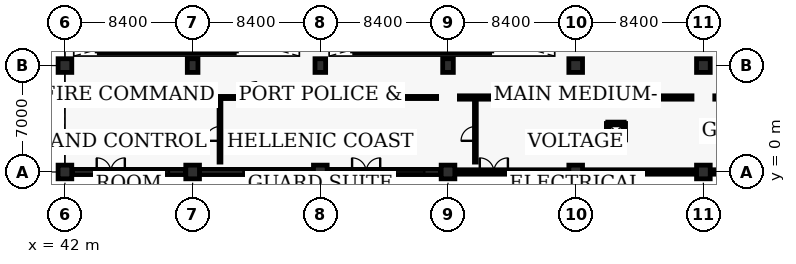
"""IFC4 building model, lengths in metres.
Left out: names, types, materials, properties, quantities, classifications, styles, units other than length and angle.
Written with IfcOpenShell. Run it as: python <this file> out.ifc"""

import sys

from ifc_helpers import new_model, si_unit, direction, frame, frame_2d, origin, origin_2d, place, context, subcontext, project, spatial, rectangle, extrude, element, fill, save


model = new_model("IFC4")
c1 = context("Model", 3, precision=1e-05, world=origin(), true_north=direction((0.0, 1.0)))
c2 = subcontext(c1, "Body", "Model", "MODEL_VIEW")
j1 = project(units=[si_unit("LENGTHUNIT", "METRE"), si_unit("PLANEANGLEUNIT", "RADIAN")], contexts=[c1])
p1 = place(None, origin())
s1 = spatial("IfcSite", under=j1, at=p1, CompositionType="ELEMENT")
p2 = place(p1, origin())
s2 = spatial("IfcBuilding", under=s1, at=p2, CompositionType="ELEMENT")
p3 = place(p2, origin())
s3 = spatial("IfcBuildingStorey", under=s2, at=p3, CompositionType="ELEMENT", Elevation=0.0)
for number, where, z_axis, x_axis in (
    (1, (42.0, 0.0, -0.46), (0.0, 0.0, 1.0), (1.0, 0.0, 0.0)),
    (2, (42.0, 7.0, -0.46), (0.0, 0.0, 1.0), (1.0, 0.0, 0.0)),
    (3, (50.4, 0.0, -0.46), (0.0, 0.0, 1.0), (1.0, 0.0, 0.0)),
):
    element("IfcColumn", number, at=place(p3, frame(where, z_axis=z_axis, x_axis=x_axis)), inside=s3, PredefinedType="COLUMN", context=c2, shape_type="SweptSolid", body=[
        extrude(rectangle(XDim=0.9, YDim=0.9, at=origin_2d()), origin(), (0.0, 0.0, 1.0), 5.9),
    ])
p4 = place(p3, frame((50.4, 7.0, -0.46), z_axis=(0.0, 0.0, 1.0), x_axis=(1.0, 0.0, 0.0)))
e4 = element("IfcColumn", 4, at=p4, inside=s3, PredefinedType="COLUMN", context=c2, shape_type="SweptSolid", body=[
    extrude(rectangle(XDim=0.7, YDim=0.9, at=origin_2d()), origin(), (0.0, 0.0, 1.0), 5.9),
])
p5 = place(p3, frame((58.8, 0.0, -0.46), z_axis=(0.0, 0.0, 1.0), x_axis=(1.0, 0.0, 0.0)))
e5 = element("IfcColumn", 5, at=p5, inside=s3, PredefinedType="COLUMN", context=c2, shape_type="SweptSolid", body=[
    extrude(rectangle(XDim=0.9, YDim=0.9, at=origin_2d()), origin(), (0.0, 0.0, 1.0), 5.9),
])
p6 = place(p3, frame((58.8, 7.0, -0.46), z_axis=(0.0, 0.0, 1.0), x_axis=(1.0, 0.0, 0.0)))
e6 = element("IfcColumn", 6, at=p6, inside=s3, PredefinedType="COLUMN", context=c2, shape_type="SweptSolid", body=[
    extrude(rectangle(XDim=0.7, YDim=0.9, at=origin_2d()), origin(), (0.0, 0.0, 1.0), 5.9),
])
p7 = place(p3, frame((67.2, 0.0, -0.46), z_axis=(0.0, 0.0, 1.0), x_axis=(1.0, 0.0, 0.0)))
e7 = element("IfcColumn", 7, at=p7, inside=s3, PredefinedType="COLUMN", context=c2, shape_type="SweptSolid", body=[
    extrude(rectangle(XDim=0.9, YDim=0.9, at=origin_2d()), origin(), (0.0, 0.0, 1.0), 5.9),
])
p8 = place(p3, frame((67.2, 7.0, -0.46), z_axis=(0.0, 0.0, 1.0), x_axis=(1.0, 0.0, 0.0)))
e8 = element("IfcColumn", 8, at=p8, inside=s3, PredefinedType="COLUMN", context=c2, shape_type="SweptSolid", body=[
    extrude(rectangle(XDim=0.7, YDim=0.9, at=origin_2d()), origin(), (0.0, 0.0, 1.0), 5.9),
])
for number, where, z_axis, x_axis in (
    (9, (75.6, 0.0, -0.46), (0.0, 0.0, 1.0), (1.0, 0.0, 0.0)),
    (10, (75.6, 7.0, -0.46), (0.0, 0.0, 1.0), (1.0, 0.0, 0.0)),
    (11, (84.0, 0.0, -0.46), (0.0, 0.0, 1.0), (1.0, 0.0, 0.0)),
    (12, (84.0, 7.0, -0.46), (0.0, 0.0, 1.0), (1.0, 0.0, 0.0)),
):
    element("IfcColumn", number, at=place(p3, frame(where, z_axis=z_axis, x_axis=x_axis)), inside=s3, PredefinedType="COLUMN", context=c2, shape_type="SweptSolid", body=[
        extrude(rectangle(XDim=0.9, YDim=0.9, at=origin_2d()), origin(), (0.0, 0.0, 1.0), 5.9),
    ])
p9 = place(p3, frame((42.45, 0.0, 0.0), z_axis=(0.0, 0.0, 1.0), x_axis=(1.0, 0.0, 0.0)))
e13 = element("IfcWall", 13, at=p9, inside=s3, PredefinedType="SOLIDWALL", context=c2, shape_type="SweptSolid", body=[
    extrude(rectangle(XDim=7.5, YDim=0.34, at=frame_2d((3.75, 0.0))), origin(), (0.0, 0.0, 1.0), 4.625),
])
p10 = place(p9, frame((1.64, 0.0, 0.0)))
e14 = element("IfcOpeningElement", 14, at=p10, cuts=e13, PredefinedType="OPENING", context=c2, shape_type="SweptSolid", body=[
    extrude(rectangle(XDim=1.85, YDim=2.2, at=frame_2d((0.925, 1.1))), frame((0.0, 0.18, 0.0), z_axis=(0.0, -1.0, 0.0), x_axis=(1.0, 0.0, 0.0)), (0.0, 0.0, 1.0), 0.36),
])
p11 = place(p9, frame((4.39, 0.0, 1.05)))
e15 = element("IfcOpeningElement", 15, at=p11, cuts=e13, PredefinedType="OPENING", context=c2, shape_type="SweptSolid", body=[
    extrude(rectangle(XDim=2.0, YDim=1.45, at=frame_2d((1.0, 0.725))), frame((0.0, 0.18, 0.0), z_axis=(0.0, -1.0, 0.0), x_axis=(1.0, 0.0, 0.0)), (0.0, 0.0, 1.0), 0.36),
])
p12 = place(p3, frame((50.85, 0.0, 0.0), z_axis=(0.0, 0.0, 1.0), x_axis=(1.0, 0.0, 0.0)))
e16 = element("IfcWall", 16, at=p12, inside=s3, PredefinedType="SOLIDWALL", context=c2, shape_type="SweptSolid", body=[
    extrude(rectangle(XDim=7.5, YDim=0.34, at=frame_2d((3.75, 0.0))), origin(), (0.0, 0.0, 1.0), 4.625),
])
p13 = place(p12, frame((2.89, 0.0, 1.05)))
e17 = element("IfcOpeningElement", 17, at=p13, cuts=e16, PredefinedType="OPENING", context=c2, shape_type="SweptSolid", body=[
    extrude(rectangle(XDim=1.8, YDim=1.5, at=frame_2d((0.9, 0.75))), frame((0.0, 0.18, 0.0), z_axis=(0.0, -1.0, 0.0), x_axis=(1.0, 0.0, 0.0)), (0.0, 0.0, 1.0), 0.36),
])
p14 = place(p3, frame((59.25, 0.0, 0.0), z_axis=(0.0, 0.0, 1.0), x_axis=(1.0, 0.0, 0.0)))
e18 = element("IfcWall", 18, at=p14, inside=s3, PredefinedType="SOLIDWALL", context=c2, shape_type="SweptSolid", body=[
    extrude(rectangle(XDim=7.5, YDim=0.34, at=frame_2d((3.75, 0.0))), origin(), (0.0, 0.0, 1.0), 4.625),
])
p15 = place(p14, frame((1.64, 0.0, 0.0)))
e19 = element("IfcOpeningElement", 19, at=p15, cuts=e18, PredefinedType="OPENING", context=c2, shape_type="SweptSolid", body=[
    extrude(rectangle(XDim=1.85, YDim=2.2, at=frame_2d((0.925, 1.1))), frame((0.0, 0.18, 0.0), z_axis=(0.0, -1.0, 0.0), x_axis=(1.0, 0.0, 0.0)), (0.0, 0.0, 1.0), 0.36),
])
p16 = place(p14, frame((4.39, 0.0, 1.05)))
e20 = element("IfcOpeningElement", 20, at=p16, cuts=e18, PredefinedType="OPENING", context=c2, shape_type="SweptSolid", body=[
    extrude(rectangle(XDim=2.0, YDim=1.45, at=frame_2d((1.0, 0.725))), frame((0.0, 0.18, 0.0), z_axis=(0.0, -1.0, 0.0), x_axis=(1.0, 0.0, 0.0)), (0.0, 0.0, 1.0), 0.36),
])
p17 = place(p3, frame((67.65, 0.0, 0.0), z_axis=(0.0, 0.0, 1.0), x_axis=(1.0, 0.0, 0.0)))
e21 = element("IfcWall", 21, at=p17, inside=s3, PredefinedType="SOLIDWALL", context=c2, shape_type="SweptSolid", body=[
    extrude(rectangle(XDim=7.5, YDim=0.29, at=frame_2d((3.75, 0.0))), origin(), (0.0, 0.0, 1.0), 4.625),
])
p18 = place(p17, frame((1.64, 0.0, 0.0)))
e22 = element("IfcOpeningElement", 22, at=p18, cuts=e21, PredefinedType="OPENING", context=c2, shape_type="SweptSolid", body=[
    extrude(rectangle(XDim=1.85, YDim=2.2, at=frame_2d((0.925, 1.1))), frame((0.0, 0.155, 0.0), z_axis=(0.0, -1.0, 0.0), x_axis=(1.0, 0.0, 0.0)), (0.0, 0.0, 1.0), 0.31),
])
p19 = place(p17, frame((4.39, 0.0, 1.05)))
e23 = element("IfcOpeningElement", 23, at=p19, cuts=e21, PredefinedType="OPENING", context=c2, shape_type="SweptSolid", body=[
    extrude(rectangle(XDim=1.8, YDim=1.5, at=frame_2d((0.9, 0.75))), frame((0.0, 0.155, 0.0), z_axis=(0.0, -1.0, 0.0), x_axis=(1.0, 0.0, 0.0)), (0.0, 0.0, 1.0), 0.31),
])
p20 = place(p3, frame((76.05, 0.0, 0.0), z_axis=(0.0, 0.0, 1.0), x_axis=(1.0, 0.0, 0.0)))
e24 = element("IfcWall", 24, at=p20, inside=s3, PredefinedType="SOLIDWALL", context=c2, shape_type="SweptSolid", body=[
    extrude(rectangle(XDim=7.5, YDim=0.29, at=frame_2d((3.75, 0.0))), origin(), (0.0, 0.0, 1.0), 4.625),
])
p21 = place(p20, frame((2.89, 0.0, 1.05)))
e25 = element("IfcOpeningElement", 25, at=p21, cuts=e24, PredefinedType="OPENING", context=c2, shape_type="SweptSolid", body=[
    extrude(rectangle(XDim=2.0, YDim=1.45, at=frame_2d((1.0, 0.725))), frame((0.0, 0.155, 0.0), z_axis=(0.0, -1.0, 0.0), x_axis=(1.0, 0.0, 0.0)), (0.0, 0.0, 1.0), 0.31),
])
p22 = place(p3, frame((84.45, 0.0, 0.0), z_axis=(0.0, 0.0, 1.0), x_axis=(1.0, 0.0, 0.0)))
e26 = element("IfcWall", 26, at=p22, inside=s3, PredefinedType="SOLIDWALL", context=c2, shape_type="SweptSolid", body=[
    extrude(rectangle(XDim=7.5, YDim=0.29, at=frame_2d((3.75, 0.0))), origin(), (0.0, 0.0, 1.0), 4.625),
])
p23 = place(p22, frame((2.89, 0.0, 1.05)))
e27 = element("IfcOpeningElement", 27, at=p23, cuts=e26, PredefinedType="OPENING", context=c2, shape_type="SweptSolid", body=[
    extrude(rectangle(XDim=1.8, YDim=1.5, at=frame_2d((0.9, 0.75))), frame((0.0, 0.155, 0.0), z_axis=(0.0, -1.0, 0.0), x_axis=(1.0, 0.0, 0.0)), (0.0, 0.0, 1.0), 0.31),
])
for number, where, z_axis, x_axis in (
    (28, (44.26, 7.96, 0.0), (0.0, 0.0, 1.0), (1.0, 0.0, 0.0)),
    (29, (61.06, 7.96, 0.0), (0.0, 0.0, 1.0), (1.0, 0.0, 0.0)),
):
    element("IfcWall", number, at=place(p3, frame(where, z_axis=z_axis, x_axis=x_axis)), inside=s3, PredefinedType="SHEAR", context=c2, shape_type="SweptSolid", body=[
        extrude(rectangle(XDim=8.88, YDim=0.28, at=frame_2d((4.44, 0.0))), origin(), (0.0, 0.0, 1.0), 5.44),
    ])
p24 = place(p3, frame((77.71, 2.11, 0.0), z_axis=(0.0, 0.0, 1.0), x_axis=(1.0, 0.0, 0.0)))
e30 = element("IfcWall", 30, at=p24, inside=s3, PredefinedType="SOLIDWALL", context=c2, shape_type="SweptSolid", body=[
    extrude(rectangle(XDim=1.08, YDim=0.18, at=frame_2d((0.54, 0.0))), origin(), (0.0, 0.0, 1.0), 2.6),
])
p25 = place(p3, frame((78.79, 2.11, 0.0), z_axis=(0.0, 0.0, 1.0), x_axis=(0.0, 1.0, 0.0)))
e31 = element("IfcWall", 31, at=p25, inside=s3, PredefinedType="SOLIDWALL", context=c2, shape_type="SweptSolid", body=[
    extrude(rectangle(XDim=1.08, YDim=0.18, at=frame_2d((0.54, 0.0))), origin(), (0.0, 0.0, 1.0), 2.6),
])
p26 = place(p3, frame((78.79, 3.19, 0.0), z_axis=(0.0, 0.0, 1.0), x_axis=(-1.0, 0.0, 0.0)))
e32 = element("IfcWall", 32, at=p26, inside=s3, PredefinedType="SOLIDWALL", context=c2, shape_type="SweptSolid", body=[
    extrude(rectangle(XDim=1.08, YDim=0.18, at=frame_2d((0.54, 0.0))), origin(), (0.0, 0.0, 1.0), 2.6),
])
p27 = place(p3, frame((77.71, 3.19, 0.0), z_axis=(0.0, 0.0, 1.0), x_axis=(0.0, -1.0, 0.0)))
e33 = element("IfcWall", 33, at=p27, inside=s3, PredefinedType="SOLIDWALL", context=c2, shape_type="SweptSolid", body=[
    extrude(rectangle(XDim=1.08, YDim=0.18, at=frame_2d((0.54, 0.0))), origin(), (0.0, 0.0, 1.0), 2.6),
])
p28 = place(p3, frame((42.75, 4.9, 0.0), z_axis=(0.0, 0.0, 1.0), x_axis=(1.0, 0.0, 0.0)))
e34 = element("IfcWall", 34, at=p28, inside=s3, PredefinedType="SOLIDWALL", context=c2, shape_type="SweptSolid", body=[
    extrude(rectangle(XDim=6.9, YDim=0.22, at=frame_2d((3.45, 0.0))), origin(), (0.0, 0.0, 1.0), 2.55),
])
p29 = place(p28, frame((2.4, 0.0, 0.0)))
e35 = element("IfcOpeningElement", 35, at=p29, cuts=e34, PredefinedType="OPENING", context=c2, shape_type="SweptSolid", body=[
    extrude(rectangle(XDim=0.98, YDim=2.12, at=frame_2d((0.49, 1.06))), frame((0.0, 0.12, 0.0), z_axis=(0.0, -1.0, 0.0), x_axis=(1.0, 0.0, 0.0)), (0.0, 0.0, 1.0), 0.24),
])
p30 = place(p3, frame((51.15, 4.9, 0.0), z_axis=(0.0, 0.0, 1.0), x_axis=(1.0, 0.0, 0.0)))
e36 = element("IfcWall", 36, at=p30, inside=s3, PredefinedType="PARTITIONING", context=c2, shape_type="SweptSolid", body=[
    extrude(rectangle(XDim=6.9, YDim=0.14, at=frame_2d((3.45, 0.0))), origin(), (0.0, 0.0, 1.0), 2.55),
])
p31 = place(p30, frame((2.4, 0.0, 0.0)))
e37 = element("IfcOpeningElement", 37, at=p31, cuts=e36, PredefinedType="OPENING", context=c2, shape_type="SweptSolid", body=[
    extrude(rectangle(XDim=1.04, YDim=2.14, at=frame_2d((0.52, 1.07))), frame((0.0, 0.08, 0.0), z_axis=(0.0, -1.0, 0.0), x_axis=(1.0, 0.0, 0.0)), (0.0, 0.0, 1.0), 0.16),
])
p32 = place(p3, frame((52.2, 0.65, 0.0), z_axis=(0.0, 0.0, 1.0), x_axis=(0.0, 1.0, 0.0)))
e38 = element("IfcWall", 38, at=p32, inside=s3, PredefinedType="PARTITIONING", context=c2, shape_type="SweptSolid", body=[
    extrude(rectangle(XDim=4.1, YDim=0.12, at=frame_2d((2.05, 0.0))), origin(), (0.0, 0.0, 1.0), 2.5),
])
p33 = place(p32, frame((1.4, 0.0, 0.0)))
e39 = element("IfcOpeningElement", 39, at=p33, cuts=e38, PredefinedType="OPENING", context=c2, shape_type="SweptSolid", body=[
    extrude(rectangle(XDim=0.94, YDim=2.08, at=frame_2d((0.47, 1.04))), frame((0.0, 0.07, 0.0), z_axis=(0.0, -1.0, 0.0), x_axis=(1.0, 0.0, 0.0)), (0.0, 0.0, 1.0), 0.14),
])
p34 = place(p3, frame((59.55, 4.9, 0.0), z_axis=(0.0, 0.0, 1.0), x_axis=(1.0, 0.0, 0.0)))
e40 = element("IfcWall", 40, at=p34, inside=s3, PredefinedType="PARTITIONING", context=c2, shape_type="SweptSolid", body=[
    extrude(rectangle(XDim=6.9, YDim=0.14, at=frame_2d((3.45, 0.0))), origin(), (0.0, 0.0, 1.0), 2.55),
])
p35 = place(p34, frame((2.4, 0.0, 0.0)))
e41 = element("IfcOpeningElement", 41, at=p35, cuts=e40, PredefinedType="OPENING", context=c2, shape_type="SweptSolid", body=[
    extrude(rectangle(XDim=0.98, YDim=2.12, at=frame_2d((0.49, 1.06))), frame((0.0, 0.08, 0.0), z_axis=(0.0, -1.0, 0.0), x_axis=(1.0, 0.0, 0.0)), (0.0, 0.0, 1.0), 0.16),
])
p36 = place(p3, frame((67.95, 4.9, 0.0), z_axis=(0.0, 0.0, 1.0), x_axis=(1.0, 0.0, 0.0)))
e42 = element("IfcWall", 42, at=p36, inside=s3, PredefinedType="SOLIDWALL", context=c2, shape_type="SweptSolid", body=[
    extrude(rectangle(XDim=6.9, YDim=0.22, at=frame_2d((3.45, 0.0))), origin(), (0.0, 0.0, 1.0), 2.55),
])
p37 = place(p36, frame((2.4, 0.0, 0.0)))
e43 = element("IfcOpeningElement", 43, at=p37, cuts=e42, PredefinedType="OPENING", context=c2, shape_type="SweptSolid", body=[
    extrude(rectangle(XDim=1.64, YDim=2.16, at=frame_2d((0.82, 1.08))), frame((0.0, 0.12, 0.0), z_axis=(0.0, -1.0, 0.0), x_axis=(1.0, 0.0, 0.0)), (0.0, 0.0, 1.0), 0.24),
])
p38 = place(p3, frame((69.0, 0.65, 0.0), z_axis=(0.0, 0.0, 1.0), x_axis=(0.0, 1.0, 0.0)))
e44 = element("IfcWall", 44, at=p38, inside=s3, PredefinedType="PARTITIONING", context=c2, shape_type="SweptSolid", body=[
    extrude(rectangle(XDim=4.1, YDim=0.12, at=frame_2d((2.05, 0.0))), origin(), (0.0, 0.0, 1.0), 2.5),
])
p39 = place(p38, frame((1.4, 0.0, 0.0)))
e45 = element("IfcOpeningElement", 45, at=p39, cuts=e44, PredefinedType="OPENING", context=c2, shape_type="SweptSolid", body=[
    extrude(rectangle(XDim=0.94, YDim=2.08, at=frame_2d((0.47, 1.04))), frame((0.0, 0.07, 0.0), z_axis=(0.0, -1.0, 0.0), x_axis=(1.0, 0.0, 0.0)), (0.0, 0.0, 1.0), 0.14),
])
p40 = place(p3, frame((76.35, 4.9, 0.0), z_axis=(0.0, 0.0, 1.0), x_axis=(1.0, 0.0, 0.0)))
e46 = element("IfcWall", 46, at=p40, inside=s3, PredefinedType="SOLIDWALL", context=c2, shape_type="SweptSolid", body=[
    extrude(rectangle(XDim=6.9, YDim=0.22, at=frame_2d((3.45, 0.0))), origin(), (0.0, 0.0, 1.0), 2.55),
])
p41 = place(p40, frame((2.4, 0.0, 0.0)))
e47 = element("IfcOpeningElement", 47, at=p41, cuts=e46, PredefinedType="OPENING", context=c2, shape_type="SweptSolid", body=[
    extrude(rectangle(XDim=1.64, YDim=2.16, at=frame_2d((0.82, 1.08))), frame((0.0, 0.12, 0.0), z_axis=(0.0, -1.0, 0.0), x_axis=(1.0, 0.0, 0.0)), (0.0, 0.0, 1.0), 0.24),
])
p42 = place(p3, frame((84.75, 4.9, 0.0), z_axis=(0.0, 0.0, 1.0), x_axis=(1.0, 0.0, 0.0)))
e48 = element("IfcWall", 48, at=p42, inside=s3, PredefinedType="SOLIDWALL", context=c2, shape_type="SweptSolid", body=[
    extrude(rectangle(XDim=6.9, YDim=0.22, at=frame_2d((3.45, 0.0))), origin(), (0.0, 0.0, 1.0), 2.55),
])
p43 = place(p42, frame((2.4, 0.0, 0.0)))
e49 = element("IfcOpeningElement", 49, at=p43, cuts=e48, PredefinedType="OPENING", context=c2, shape_type="SweptSolid", body=[
    extrude(rectangle(XDim=1.64, YDim=2.16, at=frame_2d((0.82, 1.08))), frame((0.0, 0.12, 0.0), z_axis=(0.0, -1.0, 0.0), x_axis=(1.0, 0.0, 0.0)), (0.0, 0.0, 1.0), 0.24),
])
p44 = place(p10, origin())
e50 = element("IfcDoor", 50, at=p44, inside=s3, OperationType="DOUBLE_DOOR_SINGLE_SWING", PredefinedType="DOOR", context=c2, shape_type="SweptSolid", body=[
    extrude(rectangle(XDim=1.85, YDim=2.2, at=frame_2d((0.925, 1.1))), frame((0.0, 0.025, 0.0), z_axis=(0.0, -1.0, 0.0), x_axis=(1.0, 0.0, 0.0)), (0.0, 0.0, 1.0), 0.05),
])
fill(e14, e50)
p45 = place(p11, origin())
e51 = element("IfcWindow", 51, at=p45, inside=s3, PartitioningType="DOUBLE_PANEL_VERTICAL", PredefinedType="WINDOW", context=c2, shape_type="SweptSolid", body=[
    extrude(rectangle(XDim=2.0, YDim=1.45, at=frame_2d((1.0, 0.725))), frame((0.0, 0.03, 0.0), z_axis=(0.0, -1.0, 0.0), x_axis=(1.0, 0.0, 0.0)), (0.0, 0.0, 1.0), 0.06),
])
fill(e15, e51)
p46 = place(p13, origin())
e52 = element("IfcWindow", 52, at=p46, inside=s3, PartitioningType="DOUBLE_PANEL_VERTICAL", PredefinedType="WINDOW", context=c2, shape_type="SweptSolid", body=[
    extrude(rectangle(XDim=1.8, YDim=1.5, at=frame_2d((0.9, 0.75))), frame((0.0, 0.03, 0.0), z_axis=(0.0, -1.0, 0.0), x_axis=(1.0, 0.0, 0.0)), (0.0, 0.0, 1.0), 0.06),
])
fill(e17, e52)
p47 = place(p15, origin())
e53 = element("IfcDoor", 53, at=p47, inside=s3, OperationType="DOUBLE_DOOR_SINGLE_SWING", PredefinedType="DOOR", context=c2, shape_type="SweptSolid", body=[
    extrude(rectangle(XDim=1.85, YDim=2.2, at=frame_2d((0.925, 1.1))), frame((0.0, 0.025, 0.0), z_axis=(0.0, -1.0, 0.0), x_axis=(1.0, 0.0, 0.0)), (0.0, 0.0, 1.0), 0.05),
])
fill(e19, e53)
p48 = place(p16, origin())
e54 = element("IfcWindow", 54, at=p48, inside=s3, PartitioningType="DOUBLE_PANEL_VERTICAL", PredefinedType="WINDOW", context=c2, shape_type="SweptSolid", body=[
    extrude(rectangle(XDim=2.0, YDim=1.45, at=frame_2d((1.0, 0.725))), frame((0.0, 0.03, 0.0), z_axis=(0.0, -1.0, 0.0), x_axis=(1.0, 0.0, 0.0)), (0.0, 0.0, 1.0), 0.06),
])
fill(e20, e54)
p49 = place(p18, origin())
e55 = element("IfcDoor", 55, at=p49, inside=s3, OperationType="DOUBLE_DOOR_SINGLE_SWING", PredefinedType="DOOR", context=c2, shape_type="SweptSolid", body=[
    extrude(rectangle(XDim=1.85, YDim=2.2, at=frame_2d((0.925, 1.1))), frame((0.0, 0.025, 0.0), z_axis=(0.0, -1.0, 0.0), x_axis=(1.0, 0.0, 0.0)), (0.0, 0.0, 1.0), 0.05),
])
fill(e22, e55)
p50 = place(p19, origin())
e56 = element("IfcWindow", 56, at=p50, inside=s3, PartitioningType="DOUBLE_PANEL_VERTICAL", PredefinedType="WINDOW", context=c2, shape_type="SweptSolid", body=[
    extrude(rectangle(XDim=1.8, YDim=1.5, at=frame_2d((0.9, 0.75))), frame((0.0, 0.03, 0.0), z_axis=(0.0, -1.0, 0.0), x_axis=(1.0, 0.0, 0.0)), (0.0, 0.0, 1.0), 0.06),
])
fill(e23, e56)
p51 = place(p21, origin())
e57 = element("IfcWindow", 57, at=p51, inside=s3, PartitioningType="DOUBLE_PANEL_VERTICAL", PredefinedType="WINDOW", context=c2, shape_type="SweptSolid", body=[
    extrude(rectangle(XDim=2.0, YDim=1.45, at=frame_2d((1.0, 0.725))), frame((0.0, 0.03, 0.0), z_axis=(0.0, -1.0, 0.0), x_axis=(1.0, 0.0, 0.0)), (0.0, 0.0, 1.0), 0.06),
])
fill(e25, e57)
p52 = place(p29, origin())
e58 = element("IfcDoor", 58, at=p52, inside=s3, OperationType="SINGLE_SWING_RIGHT", PredefinedType="DOOR", context=c2, shape_type="SweptSolid", body=[
    extrude(rectangle(XDim=0.98, YDim=2.12, at=frame_2d((0.49, 1.06))), frame((0.0, 0.025, 0.0), z_axis=(0.0, -1.0, 0.0), x_axis=(1.0, 0.0, 0.0)), (0.0, 0.0, 1.0), 0.05),
])
fill(e35, e58)
p53 = place(p31, origin())
e59 = element("IfcDoor", 59, at=p53, inside=s3, OperationType="SINGLE_SWING_RIGHT", PredefinedType="DOOR", context=c2, shape_type="SweptSolid", body=[
    extrude(rectangle(XDim=1.04, YDim=2.14, at=frame_2d((0.52, 1.07))), frame((0.0, 0.025, 0.0), z_axis=(0.0, -1.0, 0.0), x_axis=(1.0, 0.0, 0.0)), (0.0, 0.0, 1.0), 0.05),
])
fill(e37, e59)
p54 = place(p33, origin())
e60 = element("IfcDoor", 60, at=p54, inside=s3, OperationType="SINGLE_SWING_LEFT", PredefinedType="DOOR", context=c2, shape_type="SweptSolid", body=[
    extrude(rectangle(XDim=0.94, YDim=2.08, at=frame_2d((0.47, 1.04))), frame((0.0, 0.025, 0.0), z_axis=(0.0, -1.0, 0.0), x_axis=(1.0, 0.0, 0.0)), (0.0, 0.0, 1.0), 0.05),
])
fill(e39, e60)
p55 = place(p35, origin())
e61 = element("IfcDoor", 61, at=p55, inside=s3, OperationType="SINGLE_SWING_LEFT", PredefinedType="DOOR", context=c2, shape_type="SweptSolid", body=[
    extrude(rectangle(XDim=0.98, YDim=2.12, at=frame_2d((0.49, 1.06))), frame((0.0, 0.025, 0.0), z_axis=(0.0, -1.0, 0.0), x_axis=(1.0, 0.0, 0.0)), (0.0, 0.0, 1.0), 0.05),
])
fill(e41, e61)
p56 = place(p37, origin())
e62 = element("IfcDoor", 62, at=p56, inside=s3, OperationType="DOUBLE_DOOR_SINGLE_SWING", PredefinedType="DOOR", context=c2, shape_type="SweptSolid", body=[
    extrude(rectangle(XDim=1.64, YDim=2.16, at=frame_2d((0.82, 1.08))), frame((0.0, 0.025, 0.0), z_axis=(0.0, -1.0, 0.0), x_axis=(1.0, 0.0, 0.0)), (0.0, 0.0, 1.0), 0.05),
])
fill(e43, e62)
p57 = place(p39, origin())
e63 = element("IfcDoor", 63, at=p57, inside=s3, OperationType="SINGLE_SWING_LEFT", PredefinedType="DOOR", context=c2, shape_type="SweptSolid", body=[
    extrude(rectangle(XDim=0.94, YDim=2.08, at=frame_2d((0.47, 1.04))), frame((0.0, 0.025, 0.0), z_axis=(0.0, -1.0, 0.0), x_axis=(1.0, 0.0, 0.0)), (0.0, 0.0, 1.0), 0.05),
])
fill(e45, e63)
p58 = place(p41, origin())
e64 = element("IfcDoor", 64, at=p58, inside=s3, OperationType="DOUBLE_DOOR_SINGLE_SWING", PredefinedType="DOOR", context=c2, shape_type="SweptSolid", body=[
    extrude(rectangle(XDim=1.64, YDim=2.16, at=frame_2d((0.82, 1.08))), frame((0.0, 0.025, 0.0), z_axis=(0.0, -1.0, 0.0), x_axis=(1.0, 0.0, 0.0)), (0.0, 0.0, 1.0), 0.05),
])
fill(e47, e64)
save(model, sys.argv[1])
